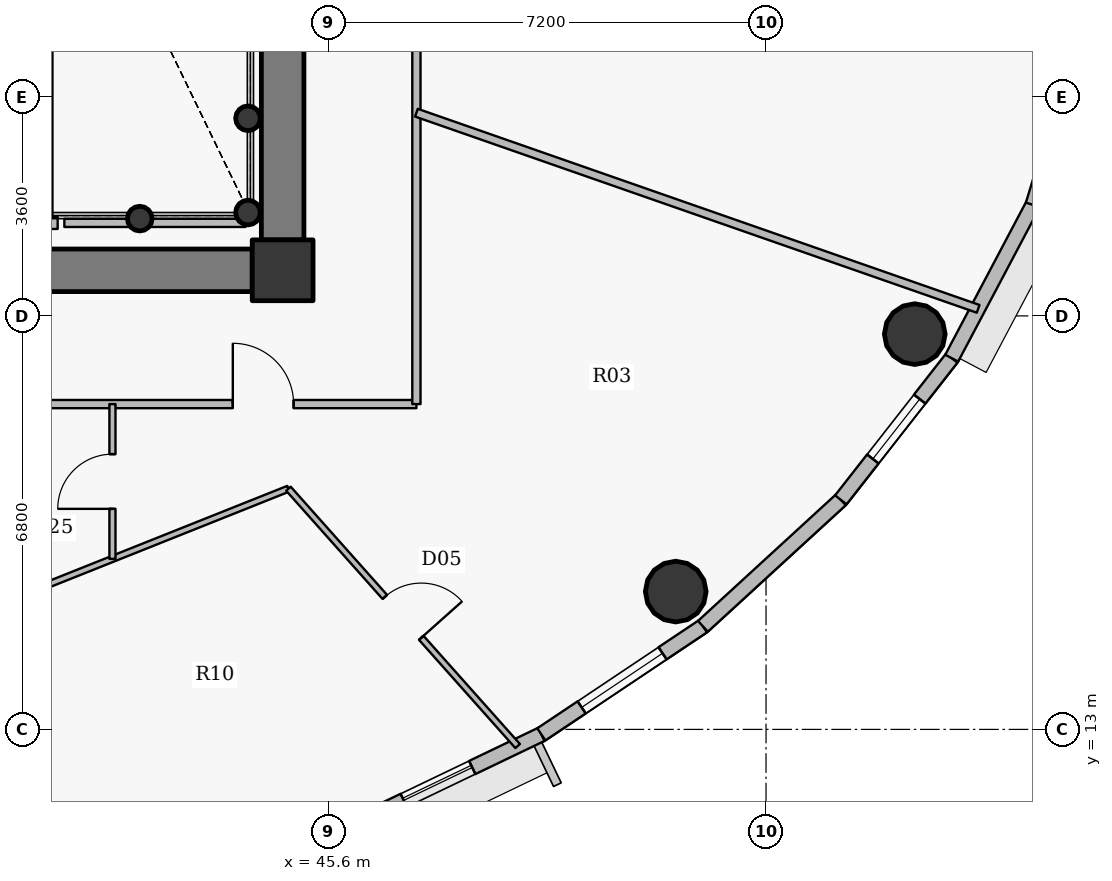
"""IFC4 building model, lengths in metres.
Left out: names, types, materials, properties, quantities, classifications, styles, units other than length and angle.
Written with IfcOpenShell. Run it as: python <this file> out.ifc"""

import sys

from ifc_helpers import new_model, si_unit, direction, frame, frame_2d, origin, origin_2d, place, context, subcontext, project, spatial, rectangle, hollow_circle, extrude, source, transform, mapped, element, fill, save


model = new_model("IFC4")
c1 = context("Model", 3, precision=1e-05, world=origin(), true_north=direction((0.0, 1.0)))
c2 = subcontext(c1, "Body", "Model", "MODEL_VIEW")
j1 = project(units=[si_unit("LENGTHUNIT", "METRE"), si_unit("PLANEANGLEUNIT", "RADIAN")], contexts=[c1])
p1 = place(None, origin())
s1 = spatial("IfcSite", under=j1, at=p1, CompositionType="ELEMENT")
p2 = place(p1, origin())
s2 = spatial("IfcBuilding", under=s1, at=p2, CompositionType="ELEMENT")
p3 = place(p2, frame((0.0, 0.0, 295.5)))
s3 = spatial("IfcBuildingStorey", under=s2, at=p3, CompositionType="ELEMENT", Elevation=295.5)
p4 = place(p3, frame((44.85, 20.55, 0.0), z_axis=(0.0, 0.0, 1.0), x_axis=(1.0, 0.0, 0.0)))
e1 = element("IfcColumn", 1, at=p4, inside=s3, PredefinedType="COLUMN", context=c2, shape_type="SweptSolid", body=[
    extrude(rectangle(XDim=1.0, YDim=1.0, at=origin_2d()), origin(), (0.0, 0.0, 1.0), 3.75),
])
for number, where, z_axis, x_axis in (
    (2, (44.28, 21.5, 0.0), (0.0, 0.0, 1.0), (1.0, 0.0, 0.0)),
    (3, (44.28, 23.05, 0.0), (0.0, 0.0, 1.0), (1.0, 0.0, 0.0)),
    (4, (42.5, 21.4, 0.0), (0.0, 0.0, 1.0), (1.0, 0.0, 0.0)),
):
    element("IfcColumn", number, at=place(p3, frame(where, z_axis=z_axis, x_axis=x_axis)), inside=s3, PredefinedType="COLUMN", context=c2, shape_type="SweptSolid", body=[
        extrude(hollow_circle(Radius=0.203, WallThickness=0.016, at=origin_2d()), origin(), (0.0, 0.0, 1.0), 3.75),
    ])
p5 = place(p3, frame((44.85, 32.95, 0.0), z_axis=(0.0, 0.0, 1.0), x_axis=(0.0, -1.0, 0.0)))
e5 = element("IfcWall", 5, at=p5, inside=s3, PredefinedType="SHEAR", context=c2, shape_type="SweptSolid", body=[
    extrude(rectangle(XDim=11.9, YDim=0.7, at=frame_2d((5.95, 0.0))), origin(), (0.0, 0.0, 1.0), 3.05),
])
p6 = place(p3, frame((44.35, 20.55, 0.0), z_axis=(0.0, 0.0, 1.0), x_axis=(-1.0, 0.0, 0.0)))
e6 = element("IfcWall", 6, at=p6, inside=s3, PredefinedType="SHEAR", context=c2, shape_type="SweptSolid", body=[
    extrude(rectangle(XDim=16.7, YDim=0.7, at=frame_2d((8.35, 0.0))), origin(), (0.0, 0.0, 1.0), 3.05),
])
p7 = place(p6, frame((12.925, 0.0, 0.0)))
e7 = element("IfcOpeningElement", 7, at=p7, cuts=e6, PredefinedType="OPENING", context=c2, shape_type="SweptSolid", body=[
    extrude(rectangle(XDim=1.15, YDim=2.15, at=origin_2d()), frame((0.575, 0.36, 1.075), z_axis=(0.0, -1.0, 0.0), x_axis=(1.0, 0.0, 0.0)), (0.0, 0.0, 1.0), 0.72),
])
p8 = place(p6, frame((9.1, 0.0, 0.0)))
e8 = element("IfcOpeningElement", 8, at=p8, cuts=e6, PredefinedType="OPENING", context=c2, shape_type="SweptSolid", body=[
    extrude(rectangle(XDim=1.15, YDim=2.15, at=origin_2d()), frame((0.575, 0.36, 1.075), z_axis=(0.0, -1.0, 0.0), x_axis=(1.0, 0.0, 0.0)), (0.0, 0.0, 1.0), 0.72),
])
for number, where, z_axis, x_axis in (
    (9, (51.315, 15.267, 0.0), (0.0, 0.0, 1.0), (1.0, 0.0, 0.0)),
    (10, (55.246, 19.5, 0.0), (0.0, 0.0, 1.0), (1.0, 0.0, 0.0)),
):
    element("IfcColumn", number, at=place(p3, frame(where, z_axis=z_axis, x_axis=x_axis)), inside=s3, PredefinedType="COLUMN", context=c2, shape_type="SweptSolid", body=[
        extrude(hollow_circle(Radius=0.5, WallThickness=0.032, at=origin_2d()), origin(), (0.0, 0.0, 1.0), 3.75),
    ])
p9 = place(p3, frame((49.104, 12.918, 0.0), z_axis=(0.0, 0.0, 1.0), x_axis=(-0.901573741254, -0.43262546051, 0.0)))
e11 = element("IfcWall", 11, at=p9, inside=s3, PredefinedType="SOLIDWALL", context=c2, shape_type="SweptSolid", body=[
    extrude(rectangle(XDim=3.307, YDim=0.24, at=frame_2d((1.653, 0.0))), origin(), (0.0, 0.0, 1.0), 3.5),
])
p10 = place(p9, frame((1.26, 0.0, 0.9)))
e12 = element("IfcOpeningElement", 12, at=p10, cuts=e11, PredefinedType="OPENING", context=c2, shape_type="SweptSolid", body=[
    extrude(rectangle(XDim=1.25, YDim=1.65, at=origin_2d()), frame((0.625, 0.13, 0.825), z_axis=(0.0, -1.0, 0.0), x_axis=(1.0, 0.0, 0.0)), (0.0, 0.0, 1.0), 0.26),
])
p11 = place(p3, frame((51.762, 14.696, 0.0), z_axis=(0.0, 0.0, 1.0), x_axis=(-0.831250592635, -0.55589787933, 0.0)))
e13 = element("IfcWall", 13, at=p11, inside=s3, PredefinedType="SOLIDWALL", context=c2, shape_type="SweptSolid", body=[
    extrude(rectangle(XDim=3.197, YDim=0.24, at=frame_2d((1.599, 0.0))), origin(), (0.0, 0.0, 1.0), 3.5),
])
p12 = place(p11, frame((0.799, 0.0, 0.9)))
e14 = element("IfcOpeningElement", 14, at=p12, cuts=e13, PredefinedType="OPENING", context=c2, shape_type="SweptSolid", body=[
    extrude(rectangle(XDim=1.6, YDim=1.75, at=origin_2d()), frame((0.8, 0.13, 0.875), z_axis=(0.0, -1.0, 0.0), x_axis=(1.0, 0.0, 0.0)), (0.0, 0.0, 1.0), 0.26),
])
p13 = place(p3, frame((54.03, 16.775, 0.0), z_axis=(0.0, 0.0, 1.0), x_axis=(-0.737068506972, -0.675818034703, 0.0)))
e15 = element("IfcWall", 15, at=p13, inside=s3, PredefinedType="SOLIDWALL", context=c2, shape_type="SweptSolid", body=[
    extrude(rectangle(XDim=3.077, YDim=0.24, at=frame_2d((1.539, 0.0))), origin(), (0.0, 0.0, 1.0), 3.5),
])
p14 = place(p3, frame((55.854, 19.105, 0.0), z_axis=(0.0, 0.0, 1.0), x_axis=(-0.616337186556, -0.787482363275, 0.0)))
e16 = element("IfcWall", 16, at=p14, inside=s3, PredefinedType="SOLIDWALL", context=c2, shape_type="SweptSolid", body=[
    extrude(rectangle(XDim=2.958, YDim=0.24, at=frame_2d((1.479, 0.0))), origin(), (0.0, 0.0, 1.0), 3.5),
])
p15 = place(p14, frame((0.854, 0.0, 0.9)))
e17 = element("IfcOpeningElement", 17, at=p15, cuts=e16, PredefinedType="OPENING", context=c2, shape_type="SweptSolid", body=[
    extrude(rectangle(XDim=1.25, YDim=1.65, at=origin_2d()), frame((0.625, 0.13, 0.825), z_axis=(0.0, -1.0, 0.0), x_axis=(1.0, 0.0, 0.0)), (0.0, 0.0, 1.0), 0.26),
])
p16 = place(p3, frame((57.188, 21.628, 0.0), z_axis=(0.0, 0.0, 1.0), x_axis=(-0.467628269026, -0.883925224218, 0.0)))
e18 = element("IfcWall", 18, at=p16, inside=s3, PredefinedType="SOLIDWALL", context=c2, shape_type="SweptSolid", body=[
    extrude(rectangle(XDim=2.854, YDim=0.24, at=frame_2d((1.427, 0.0))), origin(), (0.0, 0.0, 1.0), 3.5),
])
p17 = place(p3, frame((58.002, 24.281, 0.0), z_axis=(0.0, 0.0, 1.0), x_axis=(-0.2931213403, -0.956075248012, 0.0)))
e19 = element("IfcWall", 19, at=p17, inside=s3, PredefinedType="SOLIDWALL", context=c2, shape_type="SweptSolid", body=[
    extrude(rectangle(XDim=2.775, YDim=0.24, at=frame_2d((1.388, 0.0))), origin(), (0.0, 0.0, 1.0), 3.5),
])
p18 = place(p17, frame((0.763, 0.0, 0.9)))
e20 = element("IfcOpeningElement", 20, at=p18, cuts=e19, PredefinedType="OPENING", context=c2, shape_type="SweptSolid", body=[
    extrude(rectangle(XDim=1.25, YDim=1.65, at=origin_2d()), frame((0.625, 0.13, 0.825), z_axis=(0.0, -1.0, 0.0), x_axis=(1.0, 0.0, 0.0)), (0.0, 0.0, 1.0), 0.26),
])
p19 = place(p3, frame((24.95, 18.35, 0.0), z_axis=(0.0, 0.0, 1.0), x_axis=(1.0, 0.0, 0.0)))
e21 = element("IfcWall", 21, at=p19, inside=s3, PredefinedType="PARTITIONING", context=c2, shape_type="SweptSolid", body=[
    extrude(rectangle(XDim=22.1, YDim=0.135, at=frame_2d((11.05, 0.0))), origin(), (0.0, 0.0, 1.0), 3.035),
])
p20 = place(p19, frame((8.131, 0.0, 0.0)))
e22 = element("IfcOpeningElement", 22, at=p20, cuts=e21, PredefinedType="OPENING", context=c2, shape_type="SweptSolid", body=[
    extrude(rectangle(XDim=1.0, YDim=2.15, at=origin_2d()), frame((0.5, 0.078, 1.075), z_axis=(0.0, -1.0, 0.0), x_axis=(1.0, 0.0, 0.0)), (0.0, 0.0, 1.0), 0.155),
])
p21 = place(p19, frame((19.081, 0.0, 0.0)))
e23 = element("IfcOpeningElement", 23, at=p21, cuts=e21, PredefinedType="OPENING", context=c2, shape_type="SweptSolid", body=[
    extrude(rectangle(XDim=1.0, YDim=2.15, at=origin_2d()), frame((0.5, 0.078, 1.075), z_axis=(0.0, -1.0, 0.0), x_axis=(1.0, 0.0, 0.0)), (0.0, 0.0, 1.0), 0.155),
])
p22 = place(p3, frame((40.845, 15.323, 0.0), z_axis=(0.0, 0.0, 1.0), x_axis=(0.928815810282, 0.370541752804, 0.0)))
e24 = element("IfcWall", 24, at=p22, inside=s3, PredefinedType="PARTITIONING", context=c2, shape_type="SweptSolid", body=[
    extrude(rectangle(XDim=4.414, YDim=0.1, at=frame_2d((2.207, 0.0))), origin(), (0.0, 0.0, 1.0), 3.035),
])
p23 = place(p3, frame((40.9, 21.33, 0.0), z_axis=(0.0, 0.0, 1.0), x_axis=(1.0, 0.0, 0.0)))
e25 = element("IfcWall", 25, at=p23, inside=s3, PredefinedType="PARTITIONING", context=c2, shape_type="SweptSolid", body=[
    extrude(rectangle(XDim=0.25, YDim=0.2, at=frame_2d((0.125, 0.0))), origin(), (0.0, 0.0, 1.0), 3.035),
])
p24 = place(p3, frame((42.051, 15.804, 0.0), z_axis=(0.0, 0.0, 1.0), x_axis=(0.0, 1.0, 0.0)))
e26 = element("IfcWall", 26, at=p24, inside=s3, PredefinedType="PARTITIONING", context=c2, shape_type="SweptSolid", body=[
    extrude(rectangle(XDim=2.546, YDim=0.1, at=frame_2d((1.273, 0.0))), origin(), (0.0, 0.0, 1.0), 3.5),
])
p25 = place(p24, frame((0.823, 0.0, 0.0)))
e27 = element("IfcOpeningElement", 27, at=p25, cuts=e26, PredefinedType="OPENING", context=c2, shape_type="SweptSolid", body=[
    extrude(rectangle(XDim=0.9, YDim=2.1, at=origin_2d()), frame((0.45, 0.06, 1.05), z_axis=(0.0, -1.0, 0.0), x_axis=(1.0, 0.0, 0.0)), (0.0, 0.0, 1.0), 0.12),
])
p26 = place(p3, frame((44.945, 16.958, 0.0), z_axis=(0.0, 0.0, 1.0), x_axis=(0.665162818086, -0.746698349694, 0.0)))
e28 = element("IfcWall", 28, at=p26, inside=s3, PredefinedType="PARTITIONING", context=c2, shape_type="SweptSolid", body=[
    extrude(rectangle(XDim=5.668, YDim=0.1, at=frame_2d((2.834, 0.0))), origin(), (0.0, 0.0, 1.0), 2.985),
])
p27 = place(p26, frame((2.384, 0.0, 0.0)))
e29 = element("IfcOpeningElement", 29, at=p27, cuts=e28, PredefinedType="OPENING", context=c2, shape_type="SweptSolid", body=[
    extrude(rectangle(XDim=0.9, YDim=2.1, at=origin_2d()), frame((0.45, 0.06, 1.05), z_axis=(0.0, -1.0, 0.0), x_axis=(1.0, 0.0, 0.0)), (0.0, 0.0, 1.0), 0.12),
])
p28 = place(p3, frame((47.05, 18.35, 0.0), z_axis=(0.0, 0.0, 1.0), x_axis=(0.0, 1.0, 0.0)))
e30 = element("IfcWall", 30, at=p28, inside=s3, PredefinedType="PARTITIONING", context=c2, shape_type="SweptSolid", body=[
    extrude(rectangle(XDim=17.3, YDim=0.135, at=frame_2d((8.65, 0.0))), origin(), (0.0, 0.0, 1.0), 3.035),
])
p29 = place(p28, frame((6.155, 0.0, 0.0)))
e31 = element("IfcOpeningElement", 31, at=p29, cuts=e30, PredefinedType="OPENING", context=c2, shape_type="SweptSolid", body=[
    extrude(rectangle(XDim=1.0, YDim=2.15, at=origin_2d()), frame((0.5, 0.078, 1.075), z_axis=(0.0, -1.0, 0.0), x_axis=(1.0, 0.0, 0.0)), (0.0, 0.0, 1.0), 0.155),
])
p30 = place(p3, frame((47.05, 23.142, 0.0), z_axis=(0.0, 0.0, 1.0), x_axis=(0.94410974345, -0.329631297547, 0.0)))
e32 = element("IfcWall", 32, at=p30, inside=s3, PredefinedType="PARTITIONING", context=c2, shape_type="SweptSolid", body=[
    extrude(rectangle(XDim=9.785, YDim=0.135, at=frame_2d((4.893, 0.0))), origin(), (0.0, 0.0, 1.0), 2.985),
])
p31 = place(p3, frame((44.24, 21.33, 0.0), z_axis=(0.0, 0.0, 1.0), x_axis=(-1.0, 0.0, 0.0)))
e33 = element("IfcWall", 33, at=p31, inside=s3, PredefinedType="PARTITIONING", context=c2, shape_type="SweptSolid", body=[
    extrude(rectangle(XDim=2.98, YDim=0.135, at=frame_2d((1.49, 0.0))), origin(), (0.0, 0.0, 1.0), 3.035),
])
p32 = place(p3, frame((44.36, 20.2, 0.0), z_axis=(0.0, 0.0, 1.0), x_axis=(1.0, 0.0, 0.0)))
e34 = element("IfcWall", 34, at=p32, inside=s3, PredefinedType="PARTITIONING", context=c2, shape_type="SweptSolid", body=[
    extrude(rectangle(XDim=0.84, YDim=0.135, at=frame_2d((0.42, 0.0))), origin(), (0.0, 0.0, 1.0), 3.035),
])
p33 = place(p3, frame((45.2, 20.508, 0.0), z_axis=(0.0, 0.0, 1.0), x_axis=(0.0, 1.0, 0.0)))
e35 = element("IfcWall", 35, at=p33, inside=s3, PredefinedType="PARTITIONING", context=c2, shape_type="SweptSolid", body=[
    extrude(rectangle(XDim=0.532, YDim=0.135, at=frame_2d((0.266, 0.0))), origin(), (0.0, 0.0, 1.0), 3.5),
])
m1 = source(origin(), c2, "Body", "SweptSolid", [
    extrude(rectangle(XDim=1.25, YDim=1.65, at=origin_2d()), frame((0.625, 0.03, 0.825), z_axis=(0.0, -1.0, 0.0), x_axis=(1.0, 0.0, 0.0)), (0.0, 0.0, 1.0), 0.06),
])
p34 = place(p10, origin())
e36 = element("IfcWindow", 36, at=p34, inside=s3, PartitioningType="SINGLE_PANEL", PredefinedType="WINDOW", context=c2, shape_type="MappedRepresentation", body=[
    mapped(m1, transform((0.0, 0.0, 0.0), x_axis=(1.0, 0.0, 0.0), y_axis=(0.0, 1.0, 0.0), z_axis=(0.0, 0.0, 1.0), scale=1.0)),
])
fill(e12, e36)
m2 = source(origin(), c2, "Body", "SweptSolid", [
    extrude(rectangle(XDim=1.6, YDim=1.75, at=origin_2d()), frame((0.8, 0.03, 0.875), z_axis=(0.0, -1.0, 0.0), x_axis=(1.0, 0.0, 0.0)), (0.0, 0.0, 1.0), 0.06),
])
p35 = place(p12, origin())
e37 = element("IfcWindow", 37, at=p35, inside=s3, PartitioningType="DOUBLE_PANEL_VERTICAL", PredefinedType="WINDOW", context=c2, shape_type="MappedRepresentation", body=[
    mapped(m2, transform((0.0, 0.0, 0.0), x_axis=(1.0, 0.0, 0.0), y_axis=(0.0, 1.0, 0.0), z_axis=(0.0, 0.0, 1.0), scale=1.0)),
])
fill(e14, e37)
p36 = place(p15, origin())
e38 = element("IfcWindow", 38, at=p36, inside=s3, PartitioningType="SINGLE_PANEL", PredefinedType="WINDOW", context=c2, shape_type="MappedRepresentation", body=[
    mapped(m1, transform((0.0, 0.0, 0.0), x_axis=(1.0, 0.0, 0.0), y_axis=(0.0, 1.0, 0.0), z_axis=(0.0, 0.0, 1.0), scale=1.0)),
])
fill(e17, e38)
m3 = source(origin(), c2, "Body", "SweptSolid", [
    extrude(rectangle(XDim=1.0, YDim=2.15, at=origin_2d()), frame((0.5, 0.025, 1.075), z_axis=(0.0, -1.0, 0.0), x_axis=(1.0, 0.0, 0.0)), (0.0, 0.0, 1.0), 0.05),
])
p37 = place(p21, origin())
e39 = element("IfcDoor", 39, at=p37, inside=s3, OperationType="SINGLE_SWING_LEFT", PredefinedType="DOOR", context=c2, shape_type="MappedRepresentation", body=[
    mapped(m3, transform((0.0, 0.0, 0.0), x_axis=(1.0, 0.0, 0.0), y_axis=(0.0, 1.0, 0.0), z_axis=(0.0, 0.0, 1.0), scale=1.0)),
])
fill(e23, e39)
m4 = source(origin(), c2, "Body", "SweptSolid", [
    extrude(rectangle(XDim=0.9, YDim=2.1, at=origin_2d()), frame((0.45, 0.025, 1.05), z_axis=(0.0, -1.0, 0.0), x_axis=(1.0, 0.0, 0.0)), (0.0, 0.0, 1.0), 0.05),
])
p38 = place(p27, origin())
e40 = element("IfcDoor", 40, at=p38, inside=s3, OperationType="SINGLE_SWING_RIGHT", PredefinedType="DOOR", context=c2, shape_type="MappedRepresentation", body=[
    mapped(m4, transform((0.0, 0.0, 0.0), x_axis=(1.0, 0.0, 0.0), y_axis=(0.0, 1.0, 0.0), z_axis=(0.0, 0.0, 1.0), scale=1.0)),
])
fill(e29, e40)
p39 = place(p25, origin())
e41 = element("IfcDoor", 41, at=p39, inside=s3, OperationType="SINGLE_SWING_LEFT", PredefinedType="DOOR", context=c2, shape_type="MappedRepresentation", body=[
    mapped(m4, transform((0.0, 0.0, 0.0), x_axis=(1.0, 0.0, 0.0), y_axis=(0.0, 1.0, 0.0), z_axis=(0.0, 0.0, 1.0), scale=1.0)),
])
fill(e27, e41)
save(model, sys.argv[1])
